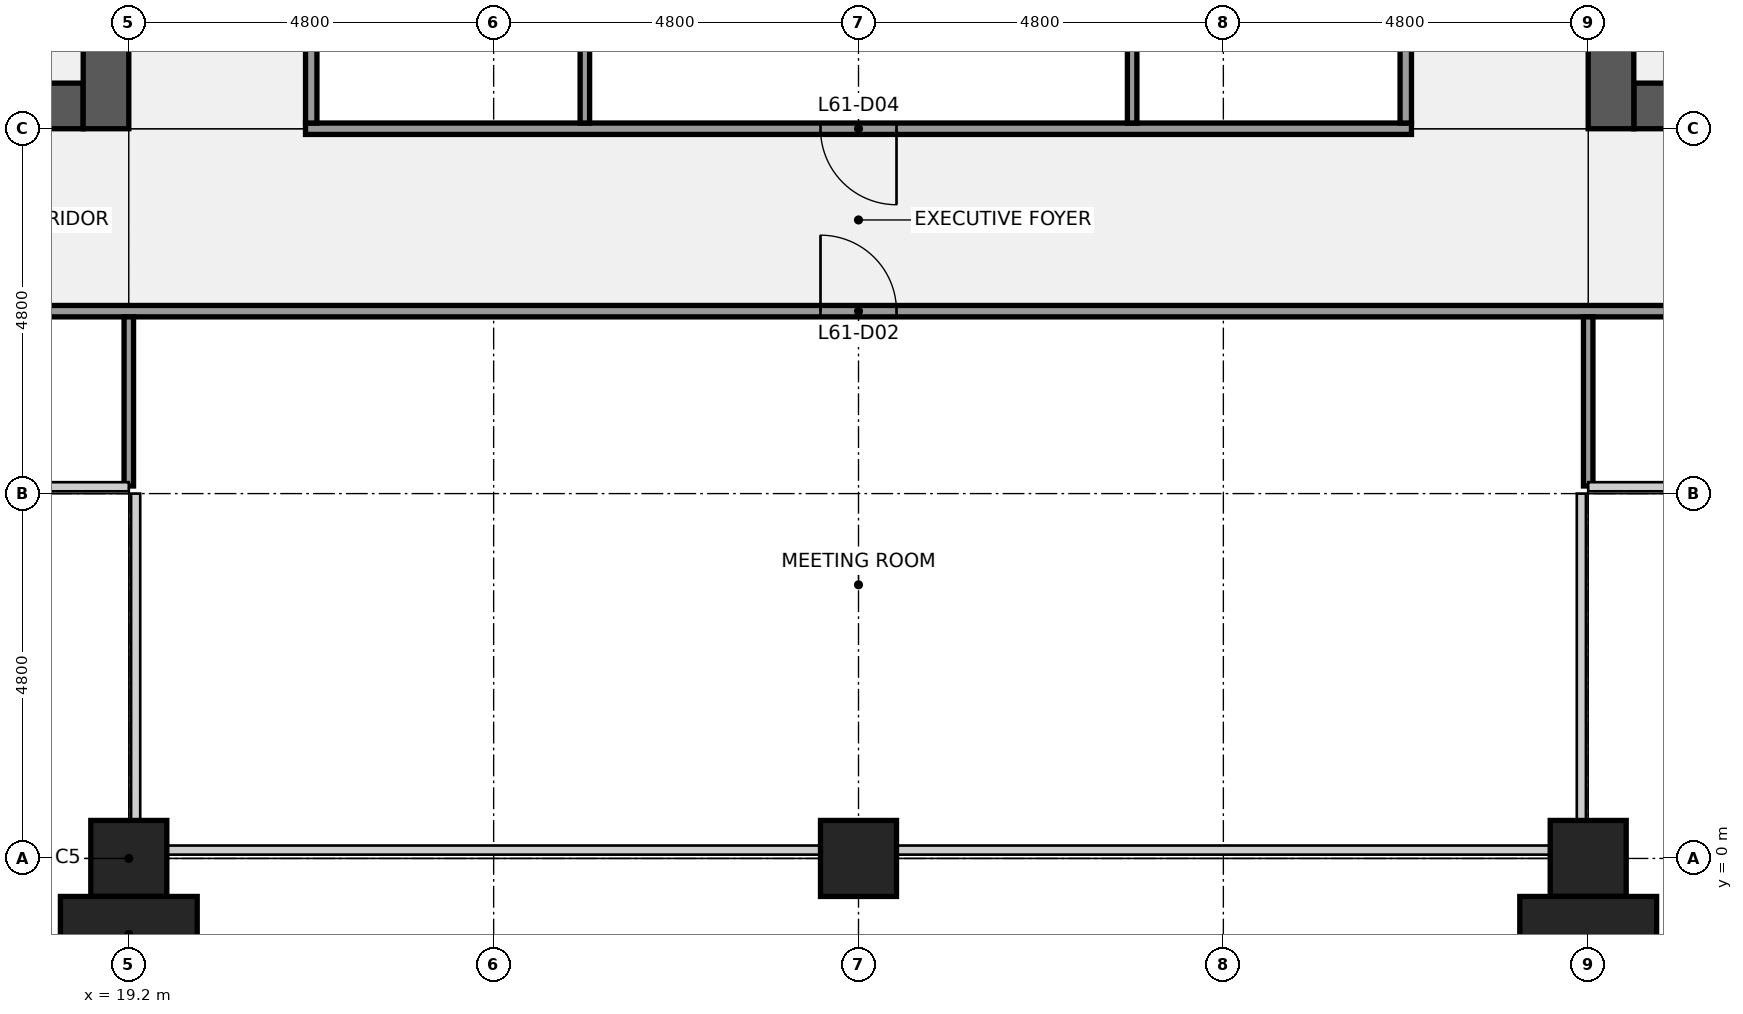
"""IFC4 building model, lengths in metres.
Left out: names, types, materials, properties, quantities, classifications, styles, units other than length and angle.
Written with IfcOpenShell. Run it as: python <this file> out.ifc"""

import sys

from ifc_helpers import new_model, si_unit, direction, frame, frame_2d, origin, origin_2d, place, context, subcontext, project, spatial, rectangle, extrude, element, fill, save


model = new_model("IFC4")
c1 = context("Model", 3, precision=1e-05, world=origin(), true_north=direction((0.0, 1.0)))
c2 = subcontext(c1, "Body", "Model", "MODEL_VIEW")
j1 = project(units=[si_unit("LENGTHUNIT", "METRE"), si_unit("PLANEANGLEUNIT", "RADIAN")], contexts=[c1])
p1 = place(None, origin())
s1 = spatial("IfcSite", under=j1, at=p1, CompositionType="ELEMENT")
p2 = place(p1, origin())
s2 = spatial("IfcBuilding", under=s1, at=p2, CompositionType="ELEMENT")
p3 = place(p2, frame((0.0, 0.0, 282.3)))
s3 = spatial("IfcBuildingStorey", under=s2, at=p3, CompositionType="ELEMENT", Elevation=282.3)
for number, where, z_axis, x_axis in (
    (1, (19.2, 0.0, 0.0), (0.0, 0.0, 1.0), (1.0, 0.0, 0.0)),
    (2, (28.8, 0.0, 0.0), (0.0, 0.0, 1.0), (1.0, 0.0, 0.0)),
    (3, (38.4, 0.0, 0.0), (0.0, 0.0, 1.0), (1.0, 0.0, 0.0)),
):
    element("IfcColumn", number, at=place(p3, frame(where, z_axis=z_axis, x_axis=x_axis)), inside=s3, PredefinedType="COLUMN", context=c2, shape_type="SweptSolid", body=[
        extrude(rectangle(XDim=1.0, YDim=1.0, at=origin_2d()), origin(), (0.0, 0.0, 1.0), 4.0),
    ])
p4 = place(p3, frame((18.6, 9.9, 0.0), z_axis=(0.0, 0.0, 1.0), x_axis=(-1.0, 0.0, 0.0)))
e4 = element("IfcWall", 4, at=p4, inside=s3, PredefinedType="SHEAR", context=c2, shape_type="SweptSolid", body=[
    extrude(rectangle(XDim=4.2, YDim=0.6, at=frame_2d((2.1, 0.0))), origin(), (0.0, 0.0, 1.0), 3.84),
])
p5 = place(p4, frame((1.25, 0.0, 0.0)))
e5 = element("IfcOpeningElement", 5, at=p5, cuts=e4, PredefinedType="OPENING", context=c2, shape_type="SweptSolid", body=[
    extrude(rectangle(XDim=1.1, YDim=2.1, at=frame_2d((0.55, 1.05))), frame((0.0, 0.31, 0.0), z_axis=(0.0, -1.0, 0.0), x_axis=(1.0, 0.0, 0.0)), (0.0, 0.0, 1.0), 0.62),
])
p6 = place(p3, frame((18.9, 38.4, 0.0), z_axis=(0.0, 0.0, 1.0), x_axis=(0.0, -1.0, 0.0)))
e6 = element("IfcWall", 6, at=p6, inside=s3, PredefinedType="SHEAR", context=c2, shape_type="SweptSolid", body=[
    extrude(rectangle(XDim=28.8, YDim=0.6, at=frame_2d((14.4, 0.0))), origin(), (0.0, 0.0, 1.0), 3.84),
])
p7 = place(p6, frame((18.3, 0.0, 0.0)))
e7 = element("IfcOpeningElement", 7, at=p7, cuts=e6, PredefinedType="OPENING", context=c2, shape_type="SweptSolid", body=[
    extrude(rectangle(XDim=1.8, YDim=2.1, at=frame_2d((0.9, 1.05))), frame((0.0, 0.31, 0.0), z_axis=(0.0, -1.0, 0.0), x_axis=(1.0, 0.0, 0.0)), (0.0, 0.0, 1.0), 0.62),
])
p8 = place(p6, frame((8.7, 0.0, 0.0)))
e8 = element("IfcOpeningElement", 8, at=p8, cuts=e6, PredefinedType="OPENING", context=c2, shape_type="SweptSolid", body=[
    extrude(rectangle(XDim=1.8, YDim=2.1, at=frame_2d((0.9, 1.05))), frame((0.0, 0.31, 0.0), z_axis=(0.0, -1.0, 0.0), x_axis=(1.0, 0.0, 0.0)), (0.0, 0.0, 1.0), 0.62),
])
p9 = place(p3, frame((43.2, 9.9, 0.0), z_axis=(0.0, 0.0, 1.0), x_axis=(-1.0, 0.0, 0.0)))
e9 = element("IfcWall", 9, at=p9, inside=s3, PredefinedType="SHEAR", context=c2, shape_type="SweptSolid", body=[
    extrude(rectangle(XDim=4.2, YDim=0.6, at=frame_2d((2.1, 0.0))), origin(), (0.0, 0.0, 1.0), 3.84),
])
p10 = place(p9, frame((1.85, 0.0, 0.0)))
e10 = element("IfcOpeningElement", 10, at=p10, cuts=e9, PredefinedType="OPENING", context=c2, shape_type="SweptSolid", body=[
    extrude(rectangle(XDim=1.1, YDim=2.1, at=frame_2d((0.55, 1.05))), frame((0.0, 0.31, 0.0), z_axis=(0.0, -1.0, 0.0), x_axis=(1.0, 0.0, 0.0)), (0.0, 0.0, 1.0), 0.62),
])
p11 = place(p3, frame((38.7, 9.6, 0.0), z_axis=(0.0, 0.0, 1.0), x_axis=(0.0, 1.0, 0.0)))
e11 = element("IfcWall", 11, at=p11, inside=s3, PredefinedType="SHEAR", context=c2, shape_type="SweptSolid", body=[
    extrude(rectangle(XDim=28.8, YDim=0.6, at=frame_2d((14.4, 0.0))), origin(), (0.0, 0.0, 1.0), 3.84),
])
p12 = place(p11, frame((8.7, 0.0, 0.0)))
e12 = element("IfcOpeningElement", 12, at=p12, cuts=e11, PredefinedType="OPENING", context=c2, shape_type="SweptSolid", body=[
    extrude(rectangle(XDim=1.8, YDim=2.1, at=frame_2d((0.9, 1.05))), frame((0.0, 0.31, 0.0), z_axis=(0.0, -1.0, 0.0), x_axis=(1.0, 0.0, 0.0)), (0.0, 0.0, 1.0), 0.62),
])
p13 = place(p11, frame((18.3, 0.0, 0.0)))
e13 = element("IfcOpeningElement", 13, at=p13, cuts=e11, PredefinedType="OPENING", context=c2, shape_type="SweptSolid", body=[
    extrude(rectangle(XDim=1.8, YDim=2.1, at=frame_2d((0.9, 1.05))), frame((0.0, 0.31, 0.0), z_axis=(0.0, -1.0, 0.0), x_axis=(1.0, 0.0, 0.0)), (0.0, 0.0, 1.0), 0.62),
])
p14 = place(p3, frame((14.5, 7.2, 0.0), z_axis=(0.0, 0.0, 1.0), x_axis=(1.0, 0.0, 0.0)))
e14 = element("IfcWall", 14, at=p14, inside=s3, PredefinedType="PARTITIONING", context=c2, shape_type="SweptSolid", body=[
    extrude(rectangle(XDim=28.6, YDim=0.15, at=frame_2d((14.3, 0.0))), origin(), (0.0, 0.0, 1.0), 2.87),
])
p15 = place(p14, frame((1.85, 0.0, 0.0)))
e15 = element("IfcOpeningElement", 15, at=p15, cuts=e14, PredefinedType="OPENING", context=c2, shape_type="SweptSolid", body=[
    extrude(rectangle(XDim=1.0, YDim=2.1, at=frame_2d((0.5, 1.05))), frame((0.0, 0.085, 0.0), z_axis=(0.0, -1.0, 0.0), x_axis=(1.0, 0.0, 0.0)), (0.0, 0.0, 1.0), 0.17),
])
p16 = place(p14, frame((13.8, 0.0, 0.0)))
e16 = element("IfcOpeningElement", 16, at=p16, cuts=e14, PredefinedType="OPENING", context=c2, shape_type="SweptSolid", body=[
    extrude(rectangle(XDim=1.0, YDim=2.1, at=frame_2d((0.5, 1.05))), frame((0.0, 0.085, 0.0), z_axis=(0.0, -1.0, 0.0), x_axis=(1.0, 0.0, 0.0)), (0.0, 0.0, 1.0), 0.17),
])
p17 = place(p14, frame((25.75, 0.0, 0.0)))
e17 = element("IfcOpeningElement", 17, at=p17, cuts=e14, PredefinedType="OPENING", context=c2, shape_type="SweptSolid", body=[
    extrude(rectangle(XDim=1.0, YDim=2.1, at=frame_2d((0.5, 1.05))), frame((0.0, 0.085, 0.0), z_axis=(0.0, -1.0, 0.0), x_axis=(1.0, 0.0, 0.0)), (0.0, 0.0, 1.0), 0.17),
])
p18 = place(p3, frame((21.525, 9.6, 0.0), z_axis=(0.0, 0.0, 1.0), x_axis=(1.0, 0.0, 0.0)))
e18 = element("IfcWall", 18, at=p18, inside=s3, PredefinedType="PARTITIONING", context=c2, shape_type="SweptSolid", body=[
    extrude(rectangle(XDim=14.55, YDim=0.15, at=frame_2d((7.275, 0.0))), origin(), (0.0, 0.0, 1.0), 2.87),
])
p19 = place(p18, frame((6.775, 0.0, 0.0)))
e19 = element("IfcOpeningElement", 19, at=p19, cuts=e18, PredefinedType="OPENING", context=c2, shape_type="SweptSolid", body=[
    extrude(rectangle(XDim=1.0, YDim=2.1, at=frame_2d((0.5, 1.05))), frame((0.0, 0.085, 0.0), z_axis=(0.0, -1.0, 0.0), x_axis=(1.0, 0.0, 0.0)), (0.0, 0.0, 1.0), 0.17),
])
p20 = place(p3, frame((19.2, 4.9, 0.0), z_axis=(0.0, 0.0, 1.0), x_axis=(0.0, 1.0, 0.0)))
e20 = element("IfcWall", 20, at=p20, inside=s3, PredefinedType="PARTITIONING", context=c2, shape_type="SweptSolid", body=[
    extrude(rectangle(XDim=2.225, YDim=0.125, at=frame_2d((1.113, 0.0))), origin(), (0.0, 0.0, 1.0), 2.87),
])
p21 = place(p3, frame((21.6, 9.675, 0.0), z_axis=(0.0, 0.0, 1.0), x_axis=(0.0, 1.0, 0.0)))
e21 = element("IfcWall", 21, at=p21, inside=s3, PredefinedType="PARTITIONING", context=c2, shape_type="SweptSolid", body=[
    extrude(rectangle(XDim=4.65, YDim=0.15, at=frame_2d((2.325, 0.0))), origin(), (0.0, 0.0, 1.0), 2.87),
])
p22 = place(p21, frame((1.825, 0.0, 0.0)))
e22 = element("IfcOpeningElement", 22, at=p22, cuts=e21, PredefinedType="OPENING", context=c2, shape_type="SweptSolid", body=[
    extrude(rectangle(XDim=1.0, YDim=2.1, at=frame_2d((0.5, 1.05))), frame((0.0, 0.085, 0.0), z_axis=(0.0, -1.0, 0.0), x_axis=(1.0, 0.0, 0.0)), (0.0, 0.0, 1.0), 0.17),
])
for number, where, z_axis, x_axis in (
    (23, (25.2, 9.675, 0.0), (0.0, 0.0, 1.0), (0.0, 1.0, 0.0)),
    (24, (32.4, 9.675, 0.0), (0.0, 0.0, 1.0), (0.0, 1.0, 0.0)),
):
    element("IfcWall", number, at=place(p3, frame(where, z_axis=z_axis, x_axis=x_axis)), inside=s3, PredefinedType="PARTITIONING", context=c2, shape_type="SweptSolid", body=[
        extrude(rectangle(XDim=4.662, YDim=0.125, at=frame_2d((2.331, 0.0))), origin(), (0.0, 0.0, 1.0), 2.87),
    ])
p23 = place(p3, frame((36.0, 9.675, 0.0), z_axis=(0.0, 0.0, 1.0), x_axis=(0.0, 1.0, 0.0)))
e25 = element("IfcWall", 25, at=p23, inside=s3, PredefinedType="PARTITIONING", context=c2, shape_type="SweptSolid", body=[
    extrude(rectangle(XDim=4.65, YDim=0.15, at=frame_2d((2.325, 0.0))), origin(), (0.0, 0.0, 1.0), 2.87),
])
p24 = place(p23, frame((1.825, 0.0, 0.0)))
e26 = element("IfcOpeningElement", 26, at=p24, cuts=e25, PredefinedType="OPENING", context=c2, shape_type="SweptSolid", body=[
    extrude(rectangle(XDim=1.0, YDim=2.1, at=frame_2d((0.5, 1.05))), frame((0.0, 0.085, 0.0), z_axis=(0.0, -1.0, 0.0), x_axis=(1.0, 0.0, 0.0)), (0.0, 0.0, 1.0), 0.17),
])
p25 = place(p3, frame((38.4, 4.9, 0.0), z_axis=(0.0, 0.0, 1.0), x_axis=(0.0, 1.0, 0.0)))
e27 = element("IfcWall", 27, at=p25, inside=s3, PredefinedType="PARTITIONING", context=c2, shape_type="SweptSolid", body=[
    extrude(rectangle(XDim=2.225, YDim=0.125, at=frame_2d((1.113, 0.0))), origin(), (0.0, 0.0, 1.0), 2.87),
])
for number, where, z_axis, x_axis in (
    (28, (19.2, -1.0, 0.0), (0.0, 0.0, 1.0), (1.0, 0.0, 0.0)),
    (29, (38.4, -1.0, 0.0), (0.0, 0.0, 1.0), (1.0, 0.0, 0.0)),
):
    element("IfcColumn", number, at=place(p3, frame(where, z_axis=z_axis, x_axis=x_axis)), inside=s3, PredefinedType="PILASTER", context=c2, shape_type="SweptSolid", body=[
        extrude(rectangle(XDim=1.8, YDim=1.0, at=origin_2d()), origin(), (0.0, 0.0, 1.0), 4.0),
    ])
p26 = place(p16, origin())
e30 = element("IfcDoor", 30, at=p26, inside=s3, OperationType="SINGLE_SWING_LEFT", PredefinedType="DOOR", context=c2, shape_type="SweptSolid", body=[
    extrude(rectangle(XDim=1.0, YDim=2.1, at=frame_2d((0.5, 1.05))), frame((0.0, 0.025, 0.0), z_axis=(0.0, -1.0, 0.0), x_axis=(1.0, 0.0, 0.0)), (0.0, 0.0, 1.0), 0.05),
])
fill(e16, e30)
p27 = place(p19, origin())
e31 = element("IfcDoor", 31, at=p27, inside=s3, OperationType="SINGLE_SWING_RIGHT", PredefinedType="DOOR", context=c2, shape_type="SweptSolid", body=[
    extrude(rectangle(XDim=1.0, YDim=2.1, at=frame_2d((0.5, 1.05))), frame((0.0, 0.025, 0.0), z_axis=(0.0, -1.0, 0.0), x_axis=(1.0, 0.0, 0.0)), (0.0, 0.0, 1.0), 0.05),
])
fill(e19, e31)
save(model, sys.argv[1])
